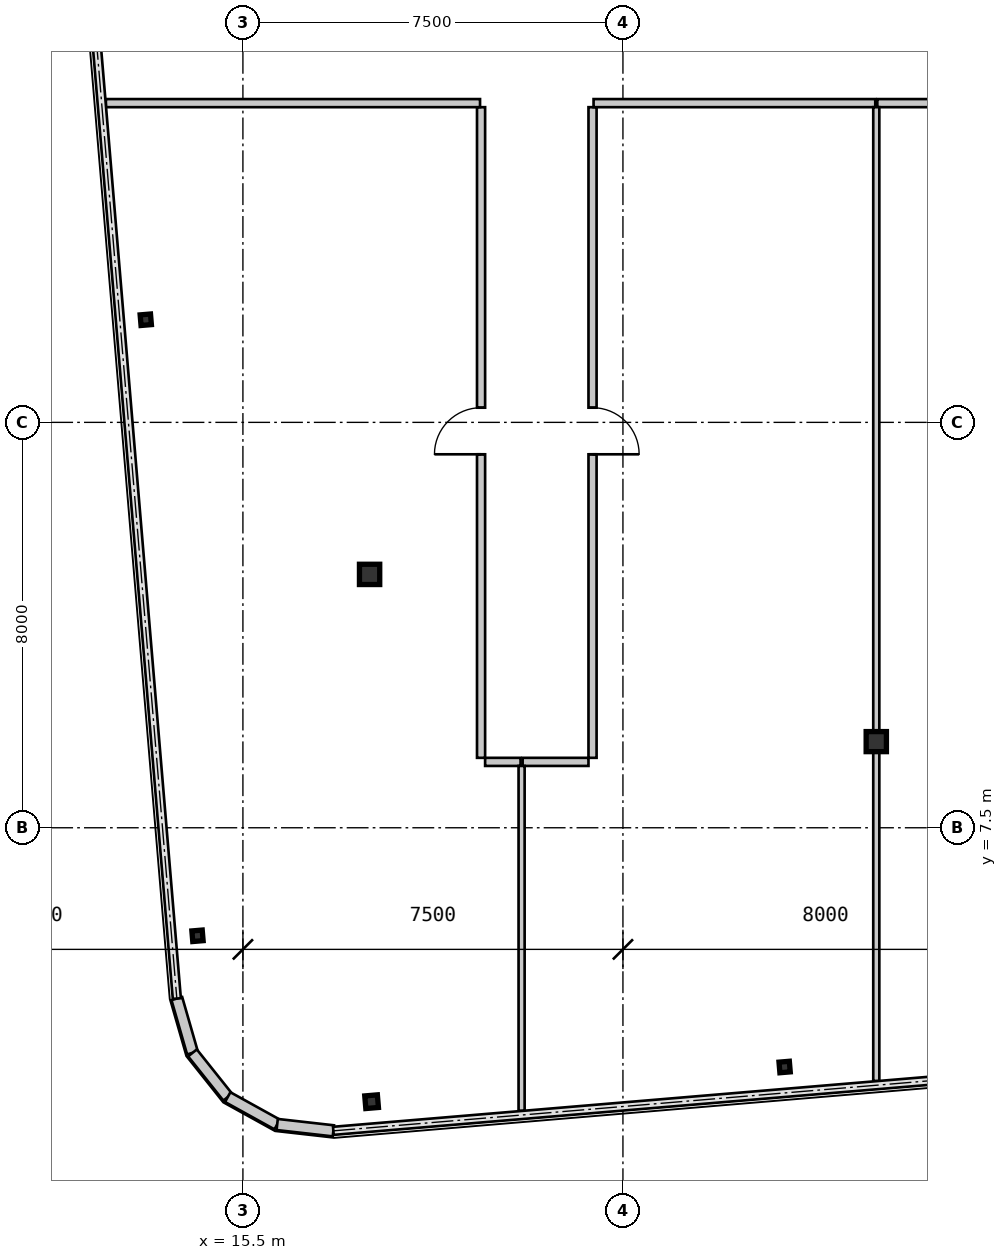
"""IFC4 building model, lengths in metres.
Left out: names, types, materials, properties, quantities, classifications, styles, units other than length and angle.
Written with IfcOpenShell. Run it as: python <this file> out.ifc"""

import sys

from ifc_helpers import new_model, si_unit, direction, frame, frame_2d, origin, origin_2d, place, context, subcontext, project, spatial, rectangle, hollow_rectangle, i_section, extrude, source, transform, mapped, element, fill, save


model = new_model("IFC4")
c1 = context("Model", 3, precision=1e-05, world=origin(), true_north=direction((0.0, 1.0)))
c2 = subcontext(c1, "Body", "Model", "MODEL_VIEW")
j1 = project(units=[si_unit("LENGTHUNIT", "METRE"), si_unit("PLANEANGLEUNIT", "RADIAN")], contexts=[c1])
p1 = place(None, origin())
s1 = spatial("IfcSite", under=j1, at=p1, CompositionType="ELEMENT")
p2 = place(p1, origin())
s2 = spatial("IfcBuilding", under=s1, at=p2, CompositionType="ELEMENT")
p3 = place(p2, frame((0.0, 0.0, 178.85)))
s3 = spatial("IfcBuildingStorey", under=s2, at=p3, CompositionType="ELEMENT", Elevation=178.85)
m1 = source(origin(), c2, "Body", "SweptSolid", [
    extrude(i_section(OverallWidth=0.4, OverallDepth=0.396, WebThickness=0.022, FlangeThickness=0.034, at=origin_2d()), origin(), (0.0, 0.0, 1.0), 3.15),
])
p4 = place(p3, frame((28.0, 9.2, 0.0), z_axis=(0.0, 0.0, 1.0), x_axis=(1.0, 0.0, 0.0)))
e1 = element("IfcColumn", 1, at=p4, inside=s3, PredefinedType="COLUMN", context=c2, shape_type="MappedRepresentation", body=[
    mapped(m1, transform((0.0, 0.0, 0.0), scale=1.0)),
])
m2 = source(origin(), c2, "Body", "SweptSolid", [
    extrude(hollow_rectangle(XDim=0.4, YDim=0.4, WallThickness=0.016, at=origin_2d()), origin(), (0.0, 0.0, 1.0), 3.15),
])
p5 = place(p3, frame((18.0, 12.5, 0.0), z_axis=(0.0, 0.0, 1.0), x_axis=(1.0, 0.0, 0.0)))
e2 = element("IfcColumn", 2, at=p5, inside=s3, PredefinedType="COLUMN", context=c2, shape_type="MappedRepresentation", body=[
    mapped(m2, transform((0.0, 0.0, 0.0), scale=1.0)),
])
m3 = source(origin(), c2, "Body", "SweptSolid", [
    extrude(hollow_rectangle(XDim=0.25, YDim=0.25, WallThickness=0.01, at=origin_2d()), origin(), (0.0, 0.0, 1.0), 3.15),
])
p6 = place(p3, frame((18.04, 2.094, 0.0), z_axis=(0.0, 0.0, 1.0), x_axis=(0.99649285925, 0.083677843332, 0.0)))
e3 = element("IfcColumn", 3, at=p6, inside=s3, PredefinedType="COLUMN", context=c2, shape_type="MappedRepresentation", body=[
    mapped(m3, transform((0.0, 0.0, 0.0), scale=1.0)),
])
m4 = source(origin(), c2, "Body", "SweptSolid", [
    extrude(i_section(OverallWidth=0.205, OverallDepth=0.21, WebThickness=0.009, FlangeThickness=0.014, at=origin_2d()), origin(), (0.0, 0.0, 1.0), 3.15),
])
for number, where, z_axis, x_axis in (
    (4, (26.191, 2.779, 0.0), (0.0, 0.0, 1.0), (0.996, 0.084, 0.0)),
    (5, (14.604, 5.368, 0.0), (0.0, 0.0, 1.0), (0.996, 0.084, 0.0)),
    (6, (13.583, 17.525, 0.0), (0.0, 0.0, 1.0), (0.996, 0.084, 0.0)),
):
    element("IfcColumn", number, at=place(p3, frame(where, z_axis=z_axis, x_axis=x_axis)), inside=s3, PredefinedType="COLUMN", context=c2, shape_type="MappedRepresentation", body=[
        mapped(m4, transform((0.0, 0.0, 0.0), scale=1.0)),
    ])
m5 = source(origin(), c2, "Body", "SweptSolid", [
    extrude(rectangle(XDim=1.116, YDim=0.22, at=frame_2d((0.558, 0.0))), origin(), (0.0, 0.0, 1.0), 2.93),
])
for number, where, z_axis, x_axis in (
    (7, (14.196, 4.13, 0.0), (0.0, 0.0, 1.0), (0.277, -0.961, 0.0)),
    (8, (14.504, 3.057, 0.0), (0.0, 0.0, 1.0), (0.623, -0.782, 0.0)),
    (9, (15.2, 2.184, 0.0), (0.0, 0.0, 1.0), (0.875, -0.484, 0.0)),
    (10, (16.176, 1.644, 0.0), (0.0, 0.0, 1.0), (0.994, -0.112, 0.0)),
):
    element("IfcWall", number, at=place(p3, frame(where, z_axis=z_axis, x_axis=x_axis)), inside=s3, PredefinedType="SOLIDWALL", context=c2, shape_type="MappedRepresentation", body=[
        mapped(m5, transform((0.0, 0.0, 0.0), scale=1.0)),
    ])
m6 = source(origin(), c2, "Body", "SweptSolid", [
    extrude(rectangle(XDim=12.84, YDim=0.16, at=frame_2d((6.42, 0.0))), origin(), (0.0, 0.0, 1.0), 2.93),
])
p7 = place(p3, frame((20.2, 8.88, 0.0), z_axis=(0.0, 0.0, 1.0), x_axis=(0.0, 1.0, 0.0)))
e11 = element("IfcWall", 11, at=p7, inside=s3, PredefinedType="PARTITIONING", context=c2, shape_type="MappedRepresentation", body=[
    mapped(m6, transform((0.0, 0.0, 0.0), scale=1.0)),
])
m7 = source(origin(), c2, "Body", "SweptSolid", [
    extrude(rectangle(XDim=0.92, YDim=2.1, at=frame_2d((0.46, 1.05))), frame((0.0, 0.09, 0.0), z_axis=(0.0, -1.0, 0.0), x_axis=(1.0, 0.0, 0.0)), (0.0, 0.0, 1.0), 0.18),
])
p8 = place(p7, frame((5.99, 0.0, 0.0)))
e12 = element("IfcOpeningElement", 12, at=p8, cuts=e11, PredefinedType="OPENING", context=c2, shape_type="MappedRepresentation", body=[
    mapped(m7, transform((0.0, 0.0, 0.0), scale=1.0)),
])
m8 = source(origin(), c2, "Body", "SweptSolid", [
    extrude(rectangle(XDim=7.384, YDim=0.16, at=frame_2d((3.692, 0.0))), origin(), (0.0, 0.0, 1.0), 2.93),
])
p9 = place(p3, frame((20.18, 21.8, 0.0), z_axis=(0.0, 0.0, 1.0), x_axis=(-1.0, 0.0, 0.0)))
e13 = element("IfcWall", 13, at=p9, inside=s3, PredefinedType="PARTITIONING", context=c2, shape_type="MappedRepresentation", body=[
    mapped(m8, transform((0.0, 0.0, 0.0), scale=1.0)),
])
m9 = source(origin(), c2, "Body", "SweptSolid", [
    extrude(rectangle(XDim=0.7, YDim=0.16, at=frame_2d((0.35, 0.0))), origin(), (0.0, 0.0, 1.0), 2.93),
])
p10 = place(p3, frame((20.98, 8.8, 0.0), z_axis=(0.0, 0.0, 1.0), x_axis=(-1.0, 0.0, 0.0)))
e14 = element("IfcWall", 14, at=p10, inside=s3, PredefinedType="PARTITIONING", context=c2, shape_type="MappedRepresentation", body=[
    mapped(m9, transform((0.0, 0.0, 0.0), scale=1.0)),
])
p11 = place(p3, frame((22.4, 21.72, 0.0), z_axis=(0.0, 0.0, 1.0), x_axis=(0.0, -1.0, 0.0)))
e15 = element("IfcWall", 15, at=p11, inside=s3, PredefinedType="PARTITIONING", context=c2, shape_type="MappedRepresentation", body=[
    mapped(m6, transform((0.0, 0.0, 0.0), scale=1.0)),
])
p12 = place(p11, frame((5.93, 0.0, 0.0)))
e16 = element("IfcOpeningElement", 16, at=p12, cuts=e15, PredefinedType="OPENING", context=c2, shape_type="MappedRepresentation", body=[
    mapped(m7, transform((0.0, 0.0, 0.0), scale=1.0)),
])
m10 = source(origin(), c2, "Body", "SweptSolid", [
    extrude(rectangle(XDim=5.559, YDim=0.16, at=frame_2d((2.78, 0.0))), origin(), (0.0, 0.0, 1.0), 2.93),
])
p13 = place(p3, frame((27.98, 21.8, 0.0), z_axis=(0.0, 0.0, 1.0), x_axis=(-1.0, 0.0, 0.0)))
e17 = element("IfcWall", 17, at=p13, inside=s3, PredefinedType="PARTITIONING", context=c2, shape_type="MappedRepresentation", body=[
    mapped(m10, transform((0.0, 0.0, 0.0), scale=1.0)),
])
m11 = source(origin(), c2, "Body", "SweptSolid", [
    extrude(rectangle(XDim=1.3, YDim=0.16, at=frame_2d((0.65, 0.0))), origin(), (0.0, 0.0, 1.0), 2.93),
])
p14 = place(p3, frame((22.32, 8.8, 0.0), z_axis=(0.0, 0.0, 1.0), x_axis=(-1.0, 0.0, 0.0)))
e18 = element("IfcWall", 18, at=p14, inside=s3, PredefinedType="PARTITIONING", context=c2, shape_type="MappedRepresentation", body=[
    mapped(m11, transform((0.0, 0.0, 0.0), scale=1.0)),
])
m12 = source(origin(), c2, "Body", "SweptSolid", [
    extrude(rectangle(XDim=6.959, YDim=0.16, at=frame_2d((3.48, 0.0))), origin(), (0.0, 0.0, 1.0), 2.93),
])
p15 = place(p3, frame((34.98, 21.8, 0.0), z_axis=(0.0, 0.0, 1.0), x_axis=(-1.0, 0.0, 0.0)))
e19 = element("IfcWall", 19, at=p15, inside=s3, PredefinedType="PARTITIONING", context=c2, shape_type="MappedRepresentation", body=[
    mapped(m12, transform((0.0, 0.0, 0.0), scale=1.0)),
])
p16 = place(p15, frame((3.02, 0.0, 0.0)))
e20 = element("IfcOpeningElement", 20, at=p16, cuts=e19, PredefinedType="OPENING", context=c2, shape_type="MappedRepresentation", body=[
    mapped(m7, transform((0.0, 0.0, 0.0), scale=1.0)),
])
m13 = source(origin(), c2, "Body", "SweptSolid", [
    extrude(rectangle(XDim=6.806, YDim=0.12, at=frame_2d((3.403, 0.0))), origin(), (0.0, 0.0, 1.0), 2.93),
])
p17 = place(p3, frame((21.0, 8.72, 0.0), z_axis=(0.0, 0.0, 1.0), x_axis=(0.0, -1.0, 0.0)))
e21 = element("IfcWall", 21, at=p17, inside=s3, PredefinedType="PARTITIONING", context=c2, shape_type="MappedRepresentation", body=[
    mapped(m13, transform((0.0, 0.0, 0.0), scale=1.0)),
])
m14 = source(origin(), c2, "Body", "SweptSolid", [
    extrude(rectangle(XDim=12.52, YDim=0.12, at=frame_2d((6.26, 0.0))), origin(), (0.0, 0.0, 1.0), 2.328),
])
p18 = place(p3, frame((28.0, 21.72, 0.0), z_axis=(0.0, 0.0, 1.0), x_axis=(0.0, -1.0, 0.0)))
e22 = element("IfcWall", 22, at=p18, inside=s3, PredefinedType="PARTITIONING", context=c2, shape_type="MappedRepresentation", body=[
    mapped(m14, transform((0.0, 0.0, 0.0), scale=1.0)),
])
m15 = source(origin(), c2, "Body", "SweptSolid", [
    extrude(rectangle(XDim=6.698, YDim=0.12, at=frame_2d((3.349, 0.0))), origin(), (0.0, 0.0, 1.0), 2.93),
])
p19 = place(p3, frame((28.0, 9.2, 0.0), z_axis=(0.0, 0.0, 1.0), x_axis=(0.0, -1.0, 0.0)))
e23 = element("IfcWall", 23, at=p19, inside=s3, PredefinedType="PARTITIONING", context=c2, shape_type="MappedRepresentation", body=[
    mapped(m15, transform((0.0, 0.0, 0.0), scale=1.0)),
])
m16 = source(origin(), c2, "Body", "SweptSolid", [
    extrude(rectangle(XDim=0.92, YDim=2.1, at=frame_2d((0.46, 1.05))), frame((0.0, 0.025, 0.0), z_axis=(0.0, -1.0, 0.0), x_axis=(1.0, 0.0, 0.0)), (0.0, 0.0, 1.0), 0.05),
])
p20 = place(p8, origin())
e24 = element("IfcDoor", 24, at=p20, inside=s3, OperationType="SINGLE_SWING_LEFT", PredefinedType="DOOR", context=c2, shape_type="MappedRepresentation", body=[
    mapped(m16, transform((0.0, 0.0, 0.0), scale=1.0)),
])
fill(e12, e24)
p21 = place(p12, origin())
e25 = element("IfcDoor", 25, at=p21, inside=s3, OperationType="SINGLE_SWING_RIGHT", PredefinedType="DOOR", context=c2, shape_type="MappedRepresentation", body=[
    mapped(m16, transform((0.0, 0.0, 0.0), scale=1.0)),
])
fill(e16, e25)
save(model, sys.argv[1])
